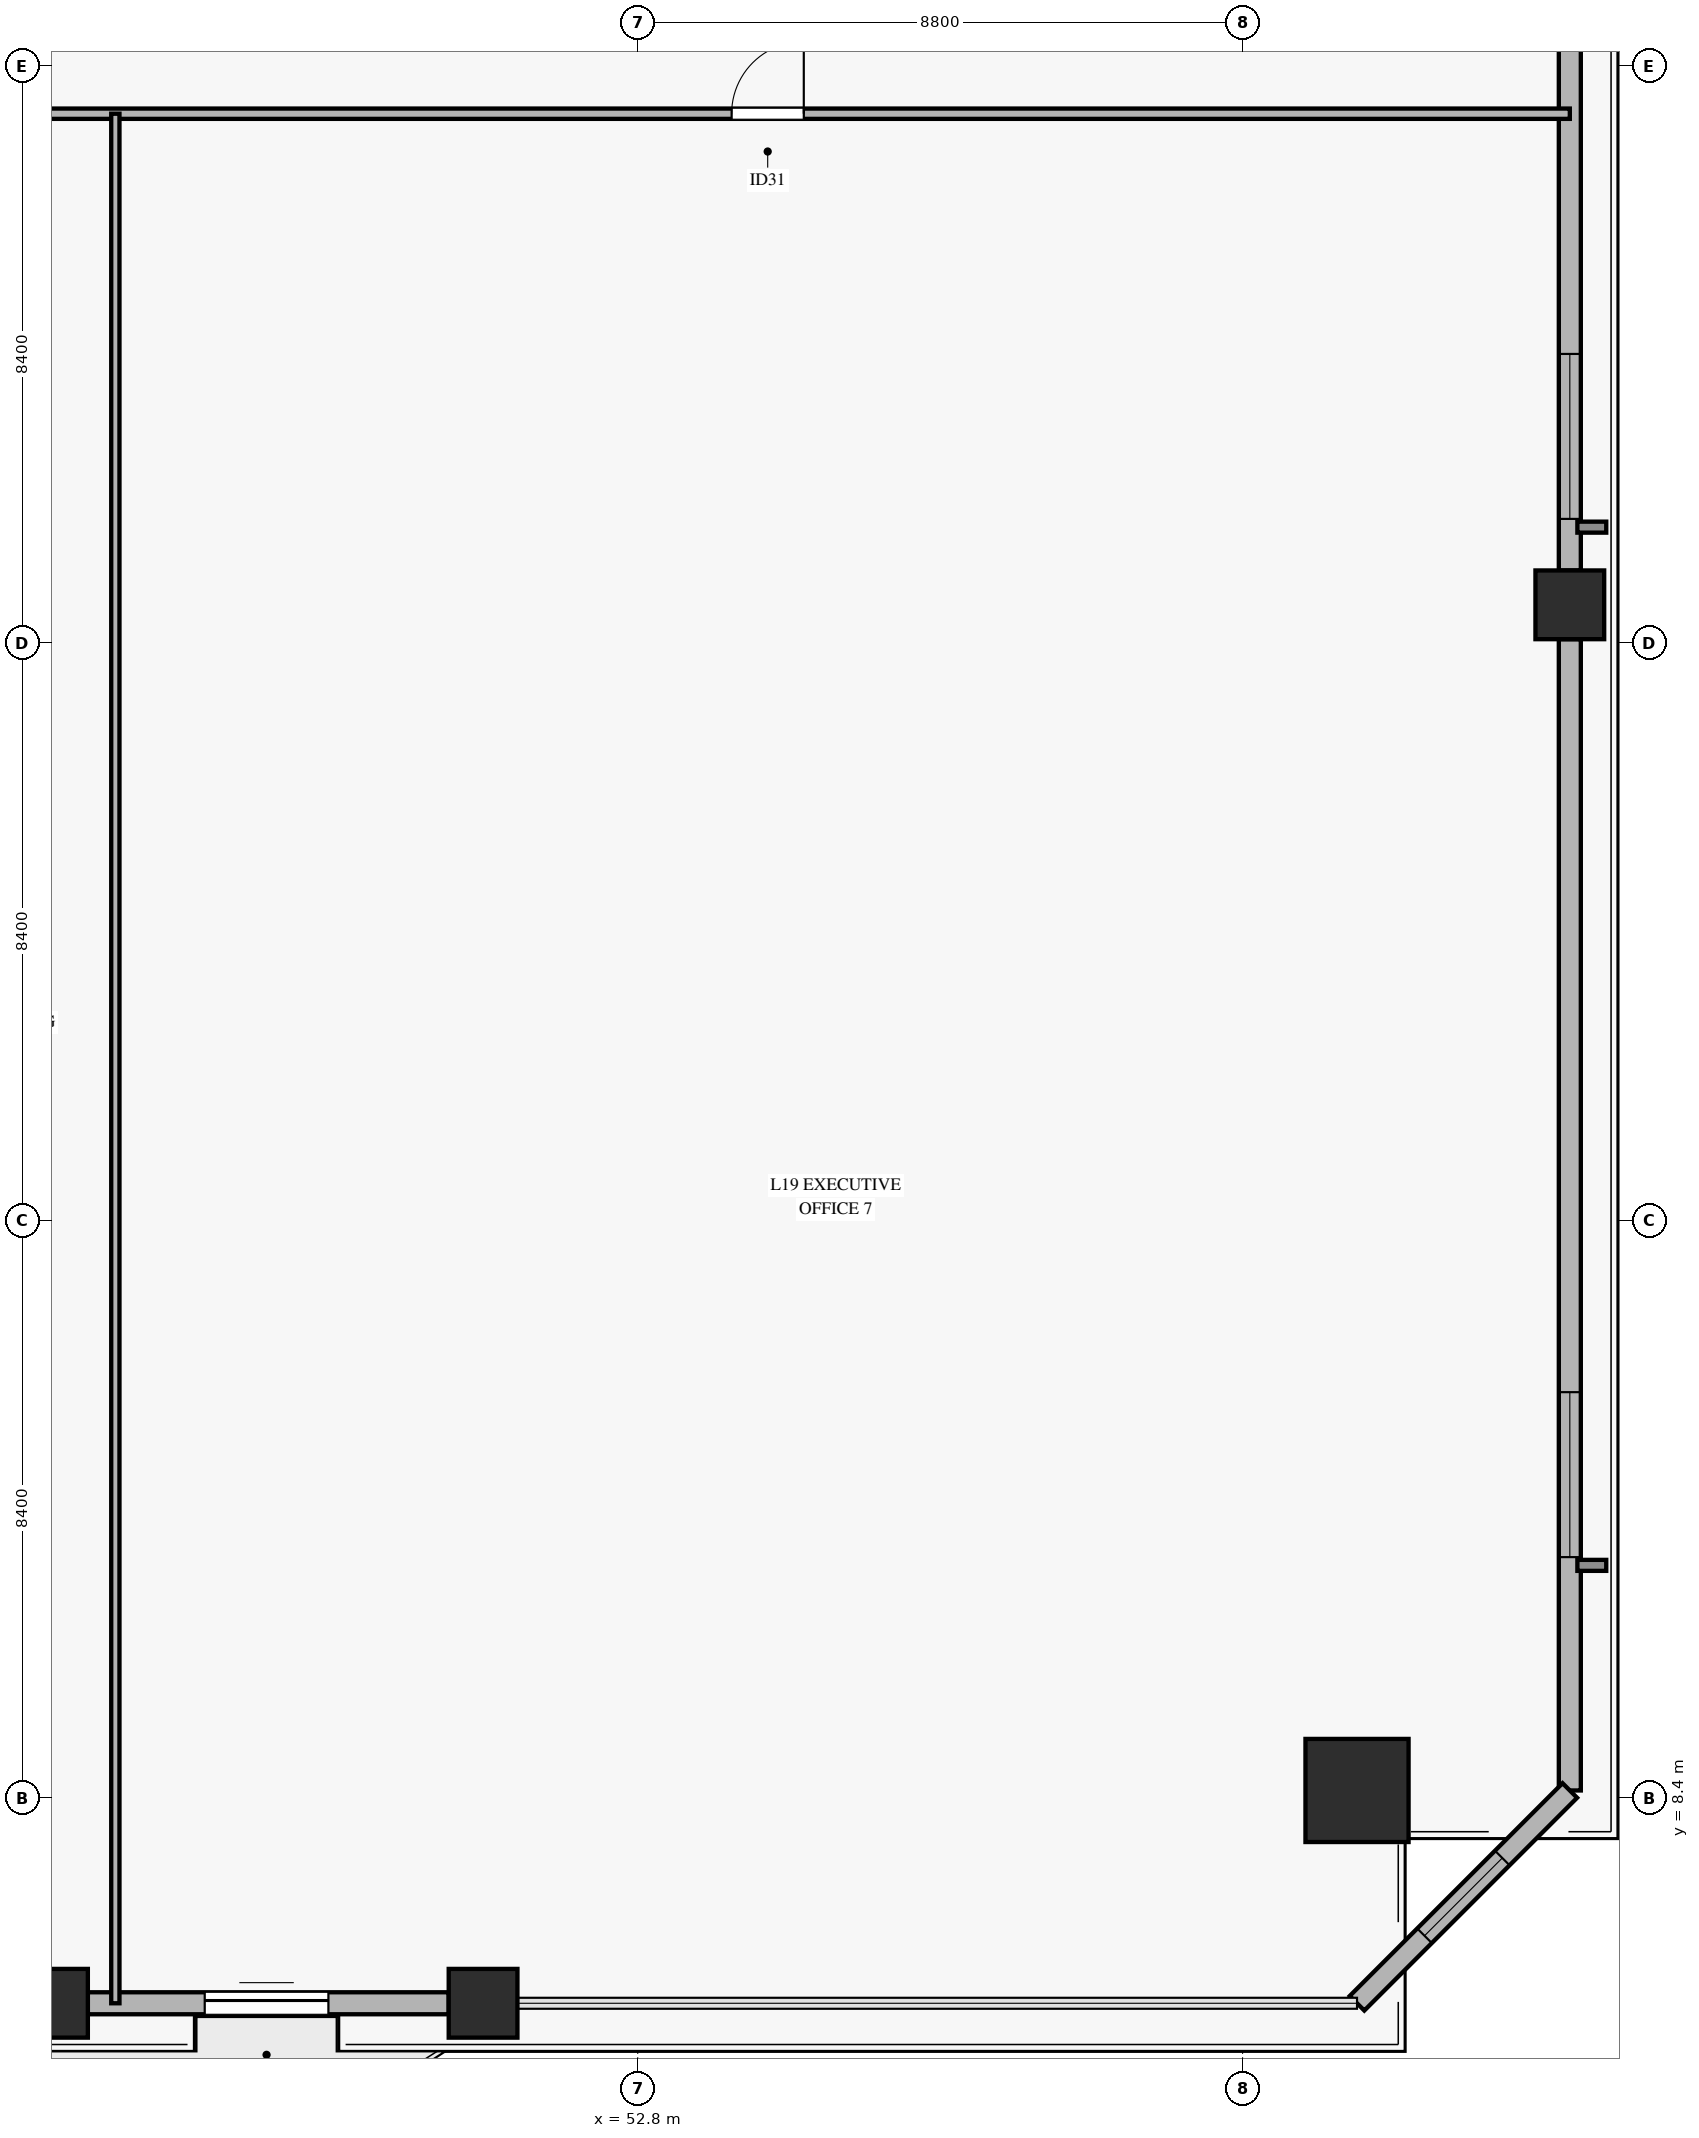
"""IFC4 building model, lengths in metres.
Left out: names, types, materials, properties, quantities, classifications, styles, units other than length and angle.
Written with IfcOpenShell. Run it as: python <this file> out.ifc"""

import sys

from ifc_helpers import new_model, si_unit, direction, frame, frame_2d, origin, origin_2d, place, context, subcontext, project, spatial, rectangle, hollow_rectangle, extrude, source, transform, mapped, element, fill, save


model = new_model("IFC4")
c1 = context("Model", 3, precision=1e-05, world=origin(), true_north=direction((0.0, 1.0)))
c2 = subcontext(c1, "Body", "Model", "MODEL_VIEW")
j1 = project(units=[si_unit("LENGTHUNIT", "METRE"), si_unit("PLANEANGLEUNIT", "RADIAN")], contexts=[c1])
p1 = place(None, origin())
s1 = spatial("IfcSite", under=j1, at=p1, CompositionType="ELEMENT")
p2 = place(p1, origin())
s2 = spatial("IfcBuilding", under=s1, at=p2, CompositionType="ELEMENT")
p3 = place(p2, frame((0.0, 0.0, 79.6)))
s3 = spatial("IfcBuildingStorey", under=s2, at=p3, CompositionType="ELEMENT", Elevation=79.6)
m1 = source(origin(), c2, "Body", "SweptSolid", [
    extrude(hollow_rectangle(XDim=1.5, YDim=1.5, WallThickness=0.07, at=origin_2d()), origin(), (0.0, 0.0, 1.0), 3.68),
])
p4 = place(p3, frame((63.265, 8.505, 0.0), z_axis=(0.0, 0.0, 1.0), x_axis=(1.0, 0.0, 0.0)))
e1 = element("IfcColumn", 1, at=p4, inside=s3, PredefinedType="COLUMN", context=c2, shape_type="MappedRepresentation", body=[
    mapped(m1, transform((0.0, 0.0, 0.0), x_axis=(1.0, 0.0, 0.0), y_axis=(0.0, 1.0, 0.0), z_axis=(0.0, 0.0, 1.0), scale=1.0)),
])
m2 = source(origin(), c2, "Body", "SweptSolid", [
    extrude(hollow_rectangle(XDim=1.0, YDim=1.0, WallThickness=0.045, at=origin_2d()), origin(), (0.0, 0.0, 1.0), 3.68),
])
for number, where, z_axis, x_axis in (
    (2, (44.3, 5.409, 0.0), (0.0, 0.0, 1.0), (1.0, 0.0, 0.0)),
    (3, (50.55, 5.409, 0.0), (0.0, 0.0, 1.0), (1.0, 0.0, 0.0)),
    (4, (66.361, 25.755, 0.0), (0.0, 0.0, 1.0), (1.0, 0.0, 0.0)),
):
    element("IfcColumn", number, at=place(p3, frame(where, z_axis=z_axis, x_axis=x_axis)), inside=s3, PredefinedType="COLUMN", context=c2, shape_type="MappedRepresentation", body=[
        mapped(m2, transform((0.0, 0.0, 0.0), x_axis=(1.0, 0.0, 0.0), y_axis=(0.0, 1.0, 0.0), z_axis=(0.0, 0.0, 1.0), scale=1.0)),
    ])
p5 = place(p3, frame((44.8, 5.409, 0.0), z_axis=(0.0, 0.0, 1.0), x_axis=(1.0, 0.0, 0.0)))
e5 = element("IfcWall", 5, at=p5, inside=s3, PredefinedType="SOLIDWALL", context=c2, shape_type="SweptSolid", body=[
    extrude(rectangle(XDim=5.25, YDim=0.32, at=frame_2d((2.625, 0.0))), origin(), (0.0, 0.0, 1.0), 3.16),
])
p6 = place(p5, frame((1.7, 0.0, 0.0)))
e6 = element("IfcOpeningElement", 6, at=p6, cuts=e5, PredefinedType="OPENING", context=c2, shape_type="SweptSolid", body=[
    extrude(rectangle(XDim=1.8, YDim=2.25, at=frame_2d((0.9, 1.125))), frame((0.0, 0.17, 0.0), z_axis=(0.0, -1.0, 0.0), x_axis=(1.0, 0.0, 0.0)), (0.0, 0.0, 1.0), 0.34),
])
p7 = place(p3, frame((66.361, 8.505, 0.0), z_axis=(0.0, 0.0, 1.0), x_axis=(0.0, 1.0, 0.0)))
e7 = element("IfcWall", 7, at=p7, inside=s3, PredefinedType="SOLIDWALL", context=c2, shape_type="SweptSolid", body=[
    extrude(rectangle(XDim=16.75, YDim=0.32, at=frame_2d((8.375, 0.0))), origin(), (0.0, 0.0, 1.0), 3.16),
])
p8 = place(p7, frame((3.395, 0.0, 0.45)))
e8 = element("IfcOpeningElement", 8, at=p8, cuts=e7, PredefinedType="OPENING", context=c2, shape_type="SweptSolid", body=[
    extrude(rectangle(XDim=2.4, YDim=2.1, at=frame_2d((1.2, 1.05))), frame((0.0, 0.17, 0.0), z_axis=(0.0, -1.0, 0.0), x_axis=(1.0, 0.0, 0.0)), (0.0, 0.0, 1.0), 0.34),
])
p9 = place(p3, frame((66.361, 26.255, 0.0), z_axis=(0.0, 0.0, 1.0), x_axis=(0.0, 1.0, 0.0)))
e9 = element("IfcWall", 9, at=p9, inside=s3, PredefinedType="SOLIDWALL", context=c2, shape_type="SweptSolid", body=[
    extrude(rectangle(XDim=16.749, YDim=0.32, at=frame_2d((8.375, 0.0))), origin(), (0.0, 0.0, 1.0), 3.16),
])
p10 = place(p9, frame((0.75, 0.0, 0.45)))
e10 = element("IfcOpeningElement", 10, at=p10, cuts=e9, PredefinedType="OPENING", context=c2, shape_type="SweptSolid", body=[
    extrude(rectangle(XDim=2.4, YDim=2.1, at=frame_2d((1.2, 1.05))), frame((0.0, 0.17, 0.0), z_axis=(0.0, -1.0, 0.0), x_axis=(1.0, 0.0, 0.0)), (0.0, 0.0, 1.0), 0.34),
])
p11 = place(p9, frame((11.793, 0.0, 0.45)))
e11 = element("IfcOpeningElement", 11, at=p11, cuts=e9, PredefinedType="OPENING", context=c2, shape_type="SweptSolid", body=[
    extrude(rectangle(XDim=2.4, YDim=2.1, at=frame_2d((1.2, 1.05))), frame((0.0, 0.17, 0.0), z_axis=(0.0, -1.0, 0.0), x_axis=(1.0, 0.0, 0.0)), (0.0, 0.0, 1.0), 0.34),
])
p12 = place(p3, frame((63.265, 5.409, 0.0), z_axis=(0.0, 0.0, 1.0), x_axis=(0.707134660098, 0.707078901175, 0.0)))
e12 = element("IfcWall", 12, at=p12, inside=s3, PredefinedType="SOLIDWALL", context=c2, shape_type="SweptSolid", body=[
    extrude(rectangle(XDim=4.378, YDim=0.3, at=frame_2d((2.189, 0.0))), origin(), (0.0, 0.0, 1.0), 3.16),
])
p13 = place(p12, frame((1.389, 0.0, 0.45)))
e13 = element("IfcOpeningElement", 13, at=p13, cuts=e12, PredefinedType="OPENING", context=c2, shape_type="SweptSolid", body=[
    extrude(rectangle(XDim=1.6, YDim=2.0, at=frame_2d((0.8, 1.0))), frame((0.0, 0.16, 0.0), z_axis=(0.0, -1.0, 0.0), x_axis=(1.0, 0.0, 0.0)), (0.0, 0.0, 1.0), 0.32),
])
p14 = place(p3, frame((4.04, 32.9, 0.0), z_axis=(0.0, 0.0, 1.0), x_axis=(1.0, 0.0, 0.0)))
e14 = element("IfcWall", 14, at=p14, inside=s3, PredefinedType="PARTITIONING", context=c2, shape_type="SweptSolid", body=[
    extrude(rectangle(XDim=62.321, YDim=0.15, at=frame_2d((31.161, 0.0))), origin(), (0.0, 0.0, 1.0), 2.765),
])
p15 = place(p14, frame((7.57, 0.0, 0.0)))
e15 = element("IfcOpeningElement", 15, at=p15, cuts=e14, PredefinedType="OPENING", context=c2, shape_type="SweptSolid", body=[
    extrude(rectangle(XDim=1.05, YDim=2.15, at=frame_2d((0.525, 1.075))), frame((0.0, 0.085, 0.0), z_axis=(0.0, -1.0, 0.0), x_axis=(1.0, 0.0, 0.0)), (0.0, 0.0, 1.0), 0.17),
])
p16 = place(p14, frame((20.043, 0.0, 0.0)))
e16 = element("IfcOpeningElement", 16, at=p16, cuts=e14, PredefinedType="OPENING", context=c2, shape_type="SweptSolid", body=[
    extrude(rectangle(XDim=1.05, YDim=2.15, at=frame_2d((0.525, 1.075))), frame((0.0, 0.085, 0.0), z_axis=(0.0, -1.0, 0.0), x_axis=(1.0, 0.0, 0.0)), (0.0, 0.0, 1.0), 0.17),
])
p17 = place(p14, frame((25.371, 0.0, 0.0)))
e17 = element("IfcOpeningElement", 17, at=p17, cuts=e14, PredefinedType="OPENING", context=c2, shape_type="SweptSolid", body=[
    extrude(rectangle(XDim=1.05, YDim=2.15, at=frame_2d((0.525, 1.075))), frame((0.0, 0.085, 0.0), z_axis=(0.0, -1.0, 0.0), x_axis=(1.0, 0.0, 0.0)), (0.0, 0.0, 1.0), 0.17),
])
p18 = place(p14, frame((29.771, 0.0, 0.0)))
e18 = element("IfcOpeningElement", 18, at=p18, cuts=e14, PredefinedType="OPENING", context=c2, shape_type="SweptSolid", body=[
    extrude(rectangle(XDim=1.05, YDim=2.15, at=frame_2d((0.525, 1.075))), frame((0.0, 0.085, 0.0), z_axis=(0.0, -1.0, 0.0), x_axis=(1.0, 0.0, 0.0)), (0.0, 0.0, 1.0), 0.17),
])
p19 = place(p14, frame((34.171, 0.0, 0.0)))
e19 = element("IfcOpeningElement", 19, at=p19, cuts=e14, PredefinedType="OPENING", context=c2, shape_type="SweptSolid", body=[
    extrude(rectangle(XDim=1.05, YDim=2.15, at=frame_2d((0.525, 1.075))), frame((0.0, 0.085, 0.0), z_axis=(0.0, -1.0, 0.0), x_axis=(1.0, 0.0, 0.0)), (0.0, 0.0, 1.0), 0.17),
])
p20 = place(p14, frame((38.655, 0.0, 0.0)))
e20 = element("IfcOpeningElement", 20, at=p20, cuts=e14, PredefinedType="OPENING", context=c2, shape_type="SweptSolid", body=[
    extrude(rectangle(XDim=1.05, YDim=2.15, at=frame_2d((0.525, 1.075))), frame((0.0, 0.085, 0.0), z_axis=(0.0, -1.0, 0.0), x_axis=(1.0, 0.0, 0.0)), (0.0, 0.0, 1.0), 0.17),
])
p21 = place(p14, frame((50.126, 0.0, 0.0)))
e21 = element("IfcOpeningElement", 21, at=p21, cuts=e14, PredefinedType="OPENING", context=c2, shape_type="SweptSolid", body=[
    extrude(rectangle(XDim=1.05, YDim=2.15, at=frame_2d((0.525, 1.075))), frame((0.0, 0.085, 0.0), z_axis=(0.0, -1.0, 0.0), x_axis=(1.0, 0.0, 0.0)), (0.0, 0.0, 1.0), 0.17),
])
p22 = place(p3, frame((45.2, 5.409, 0.0), z_axis=(0.0, 0.0, 1.0), x_axis=(0.0, 1.0, 0.0)))
e22 = element("IfcWall", 22, at=p22, inside=s3, PredefinedType="PARTITIONING", context=c2, shape_type="SweptSolid", body=[
    extrude(rectangle(XDim=27.491, YDim=0.12, at=frame_2d((13.746, 0.0))), origin(), (0.0, 0.0, 1.0), 3.165),
])
m3 = source(origin(), c2, "Body", "SweptSolid", [
    extrude(rectangle(XDim=1.8, YDim=2.25, at=frame_2d((0.9, 1.125))), frame((0.0, 0.025, 0.0), z_axis=(0.0, -1.0, 0.0), x_axis=(1.0, 0.0, 0.0)), (0.0, 0.0, 1.0), 0.05),
])
p23 = place(p6, origin())
e23 = element("IfcDoor", 23, at=p23, inside=s3, OperationType="SLIDING_TO_LEFT", PredefinedType="DOOR", context=c2, shape_type="MappedRepresentation", body=[
    mapped(m3, transform((0.0, 0.0, 0.0), x_axis=(1.0, 0.0, 0.0), y_axis=(0.0, 1.0, 0.0), z_axis=(0.0, 0.0, 1.0), scale=1.0)),
])
fill(e6, e23)
m4 = source(origin(), c2, "Body", "SweptSolid", [
    extrude(rectangle(XDim=2.4, YDim=2.1, at=frame_2d((1.2, 1.05))), frame((0.0, 0.03, 0.0), z_axis=(0.0, -1.0, 0.0), x_axis=(1.0, 0.0, 0.0)), (0.0, 0.0, 1.0), 0.06),
])
p24 = place(p8, origin())
e24 = element("IfcWindow", 24, at=p24, inside=s3, PartitioningType="SINGLE_PANEL", PredefinedType="WINDOW", context=c2, shape_type="MappedRepresentation", body=[
    mapped(m4, transform((0.0, 0.0, 0.0), x_axis=(1.0, 0.0, 0.0), y_axis=(0.0, 1.0, 0.0), z_axis=(0.0, 0.0, 1.0), scale=1.0)),
])
fill(e8, e24)
p25 = place(p10, origin())
e25 = element("IfcWindow", 25, at=p25, inside=s3, PartitioningType="SINGLE_PANEL", PredefinedType="WINDOW", context=c2, shape_type="MappedRepresentation", body=[
    mapped(m4, transform((0.0, 0.0, 0.0), x_axis=(1.0, 0.0, 0.0), y_axis=(0.0, 1.0, 0.0), z_axis=(0.0, 0.0, 1.0), scale=1.0)),
])
fill(e10, e25)
m5 = source(origin(), c2, "Body", "SweptSolid", [
    extrude(rectangle(XDim=1.6, YDim=2.0, at=frame_2d((0.8, 1.0))), frame((0.0, 0.03, 0.0), z_axis=(0.0, -1.0, 0.0), x_axis=(1.0, 0.0, 0.0)), (0.0, 0.0, 1.0), 0.06),
])
p26 = place(p13, origin())
e26 = element("IfcWindow", 26, at=p26, inside=s3, PartitioningType="SINGLE_PANEL", PredefinedType="WINDOW", context=c2, shape_type="MappedRepresentation", body=[
    mapped(m5, transform((0.0, 0.0, 0.0), x_axis=(1.0, 0.0, 0.0), y_axis=(0.0, 1.0, 0.0), z_axis=(0.0, 0.0, 1.0), scale=1.0)),
])
fill(e13, e26)
m6 = source(origin(), c2, "Body", "SweptSolid", [
    extrude(rectangle(XDim=1.05, YDim=2.15, at=frame_2d((0.525, 1.075))), frame((0.0, 0.025, 0.0), z_axis=(0.0, -1.0, 0.0), x_axis=(1.0, 0.0, 0.0)), (0.0, 0.0, 1.0), 0.05),
])
p27 = place(p21, origin())
e27 = element("IfcDoor", 27, at=p27, inside=s3, OperationType="SINGLE_SWING_RIGHT", PredefinedType="DOOR", context=c2, shape_type="MappedRepresentation", body=[
    mapped(m6, transform((0.0, 0.0, 0.0), x_axis=(1.0, 0.0, 0.0), y_axis=(0.0, 1.0, 0.0), z_axis=(0.0, 0.0, 1.0), scale=1.0)),
])
fill(e21, e27)
save(model, sys.argv[1])
